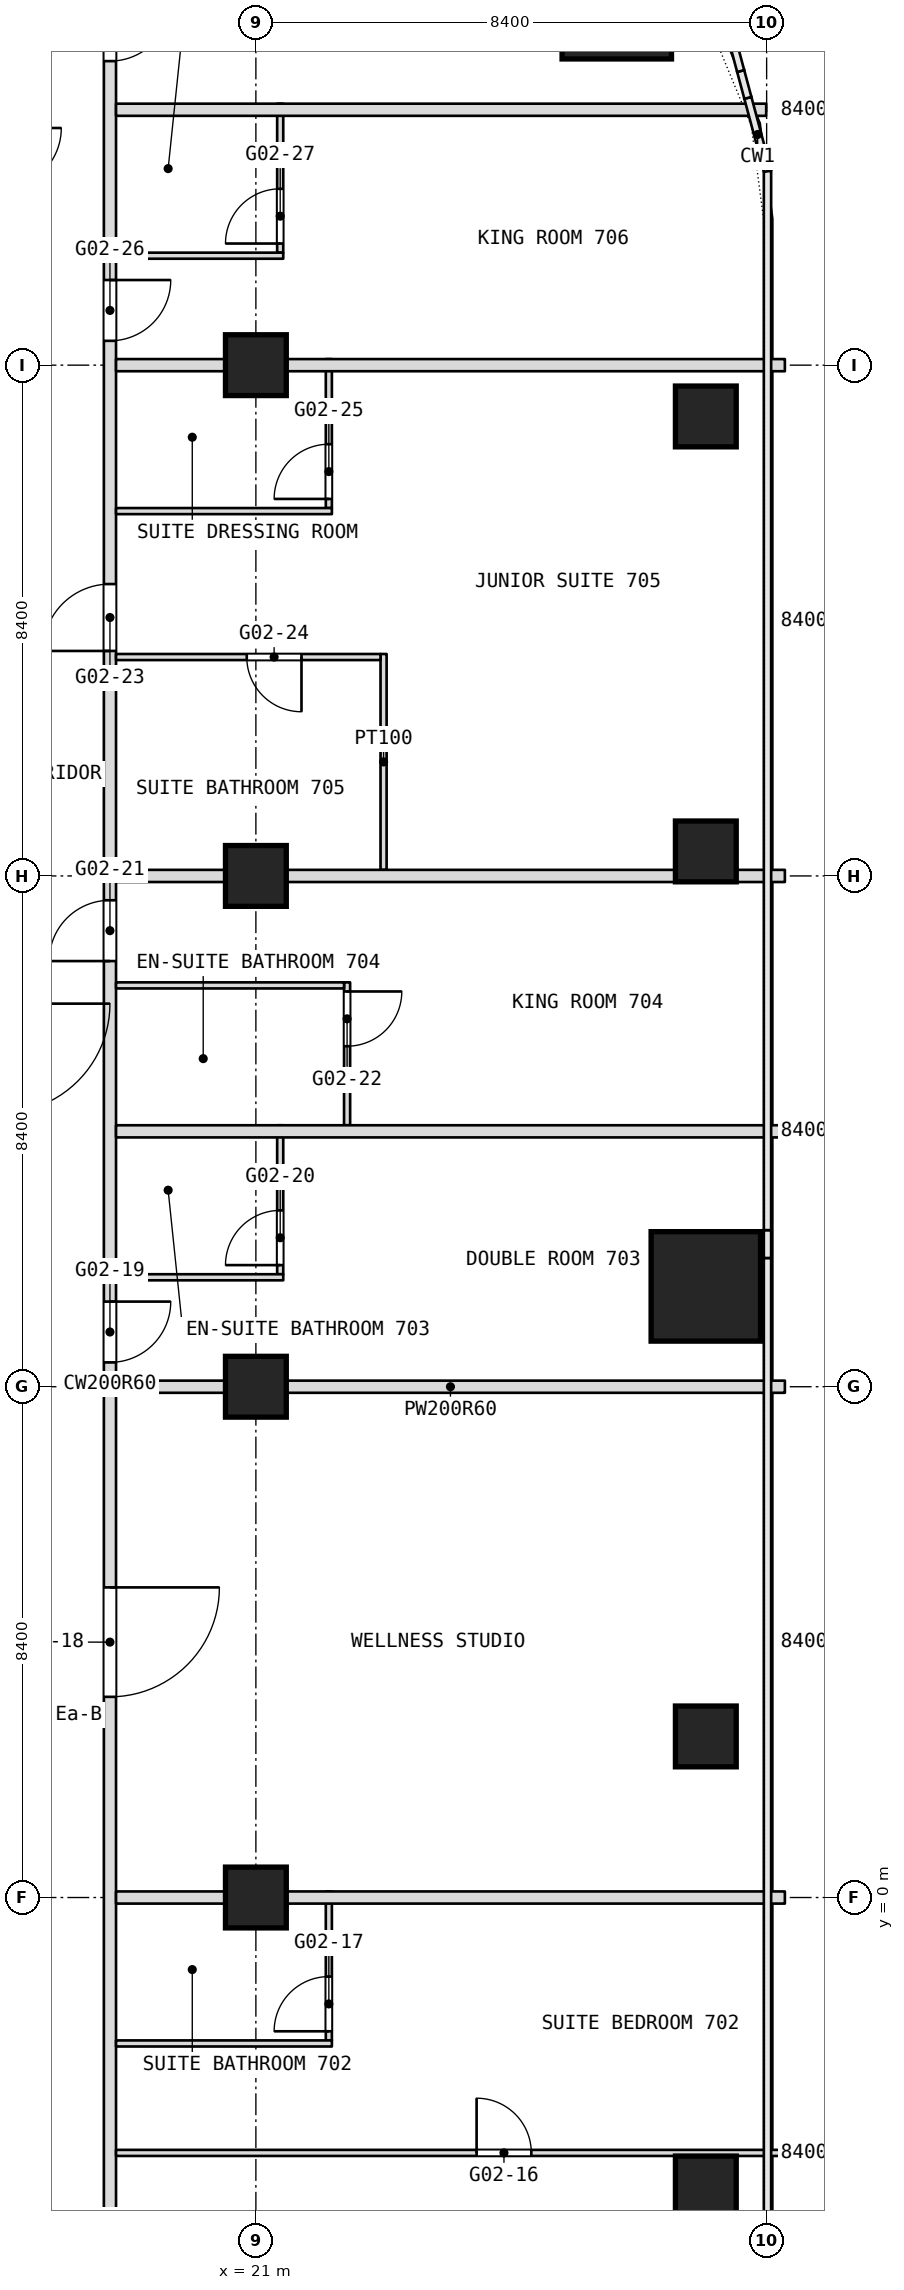
"""IFC4 building model, lengths in metres.
Left out: names, types, materials, properties, quantities, classifications, styles, units other than length and angle.
Written with IfcOpenShell. Run it as: python <this file> out.ifc"""

import sys

from ifc_helpers import new_model, si_unit, direction, frame, frame_2d, origin, origin_2d, place, context, subcontext, project, spatial, rectangle, extrude, element, fill, save


model = new_model("IFC4")
c1 = context("Model", 3, precision=1e-05, world=origin(), true_north=direction((0.0, 1.0)))
c2 = subcontext(c1, "Body", "Model", "MODEL_VIEW")
j1 = project(units=[si_unit("LENGTHUNIT", "METRE"), si_unit("PLANEANGLEUNIT", "RADIAN")], contexts=[c1])
p1 = place(None, origin())
s1 = spatial("IfcSite", under=j1, at=p1, CompositionType="ELEMENT")
p2 = place(p1, origin())
s2 = spatial("IfcBuilding", under=s1, at=p2, CompositionType="ELEMENT")
p3 = place(p2, frame((0.0, 0.0, 40.1)))
s3 = spatial("IfcBuildingStorey", under=s2, at=p3, CompositionType="ELEMENT", Elevation=40.1)
for number, where, z_axis, x_axis in (
    (1, (28.4, 10.05, 0.0), (0.0, 0.0, 1.0), (1.0, 0.0, 0.0)),
    (2, (26.936, 31.135, 0.0), (0.0, 0.0, 1.0), (1.0, 0.0, 0.0)),
):
    element("IfcColumn", number, at=place(p3, frame(where, z_axis=z_axis, x_axis=x_axis)), inside=s3, PredefinedType="COLUMN", context=c2, shape_type="SweptSolid", body=[
        extrude(rectangle(XDim=1.8, YDim=1.8, at=origin_2d()), origin(), (0.0, 0.0, 1.0), 3.6),
    ])
for number, where, z_axis, x_axis in (
    (3, (21.0, 0.0, 0.0), (0.0, 0.0, 1.0), (1.0, 0.0, 0.0)),
    (4, (21.0, 8.4, 0.0), (0.0, 0.0, 1.0), (1.0, 0.0, 0.0)),
    (5, (21.0, 16.8, 0.0), (0.0, 0.0, 1.0), (1.0, 0.0, 0.0)),
    (6, (21.0, 25.2, 0.0), (0.0, 0.0, 1.0), (1.0, 0.0, 0.0)),
    (7, (28.4, 24.356, 0.0), (0.0, 0.0, 1.0), (1.0, 0.0, 0.0)),
    (8, (28.4, 17.203, 0.0), (0.0, 0.0, 1.0), (1.0, 0.0, 0.0)),
    (9, (28.4, 2.649, 0.0), (0.0, 0.0, 1.0), (1.0, 0.0, 0.0)),
    (10, (28.4, -4.752, 0.0), (0.0, 0.0, 1.0), (1.0, 0.0, 0.0)),
):
    element("IfcColumn", number, at=place(p3, frame(where, z_axis=z_axis, x_axis=x_axis)), inside=s3, PredefinedType="COLUMN", context=c2, shape_type="SweptSolid", body=[
        extrude(rectangle(XDim=1.0, YDim=1.0, at=origin_2d()), origin(), (0.0, 0.0, 1.0), 3.6),
    ])
p4 = place(p3, frame((23.1, 16.9, 0.0), z_axis=(0.0, 0.0, 1.0), x_axis=(0.0, 1.0, 0.0)))
e11 = element("IfcWall", 11, at=p4, inside=s3, PredefinedType="PARTITIONING", context=c2, shape_type="SweptSolid", body=[
    extrude(rectangle(XDim=3.55, YDim=0.1, at=frame_2d((1.775, 0.0))), origin(), (0.0, 0.0, 1.0), 3.34),
])
p5 = place(p3, frame((22.5, 12.7, 0.0), z_axis=(0.0, 0.0, 1.0), x_axis=(0.0, 1.0, 0.0)))
e12 = element("IfcWall", 12, at=p5, inside=s3, PredefinedType="PARTITIONING", context=c2, shape_type="SweptSolid", body=[
    extrude(rectangle(XDim=2.35, YDim=0.1, at=frame_2d((1.175, 0.0))), origin(), (0.0, 0.0, 1.0), 3.34),
])
p6 = place(p5, frame((1.3, 0.0, 0.0)))
e13 = element("IfcOpeningElement", 13, at=p6, cuts=e12, PredefinedType="OPENING", context=c2, shape_type="SweptSolid", body=[
    extrude(rectangle(XDim=0.9, YDim=2.1, at=frame_2d((0.45, 1.05))), frame((0.0, 0.05, 0.0), z_axis=(0.0, -1.0, 0.0), x_axis=(1.0, 0.0, 0.0)), (0.0, 0.0, 1.0), 0.1),
])
p7 = place(p3, frame((22.2, -2.35, 0.0), z_axis=(0.0, 0.0, 1.0), x_axis=(0.0, 1.0, 0.0)))
e14 = element("IfcWall", 14, at=p7, inside=s3, PredefinedType="PARTITIONING", context=c2, shape_type="SweptSolid", body=[
    extrude(rectangle(XDim=2.45, YDim=0.1, at=frame_2d((1.225, 0.0))), origin(), (0.0, 0.0, 1.0), 3.34),
])
p8 = place(p7, frame((0.15, 0.0, 0.0)))
e15 = element("IfcOpeningElement", 15, at=p8, cuts=e14, PredefinedType="OPENING", context=c2, shape_type="SweptSolid", body=[
    extrude(rectangle(XDim=0.9, YDim=2.1, at=frame_2d((0.45, 1.05))), frame((0.0, 0.05, 0.0), z_axis=(0.0, -1.0, 0.0), x_axis=(1.0, 0.0, 0.0)), (0.0, 0.0, 1.0), 0.1),
])
p9 = place(p3, frame((22.2, 22.85, 0.0), z_axis=(0.0, 0.0, 1.0), x_axis=(0.0, 1.0, 0.0)))
e16 = element("IfcWall", 16, at=p9, inside=s3, PredefinedType="PARTITIONING", context=c2, shape_type="SweptSolid", body=[
    extrude(rectangle(XDim=2.45, YDim=0.1, at=frame_2d((1.225, 0.0))), origin(), (0.0, 0.0, 1.0), 3.34),
])
p10 = place(p9, frame((0.15, 0.0, 0.0)))
e17 = element("IfcOpeningElement", 17, at=p10, cuts=e16, PredefinedType="OPENING", context=c2, shape_type="SweptSolid", body=[
    extrude(rectangle(XDim=0.9, YDim=2.1, at=frame_2d((0.45, 1.05))), frame((0.0, 0.05, 0.0), z_axis=(0.0, -1.0, 0.0), x_axis=(1.0, 0.0, 0.0)), (0.0, 0.0, 1.0), 0.1),
])
p11 = place(p3, frame((21.4, 10.25, 0.0), z_axis=(0.0, 0.0, 1.0), x_axis=(0.0, 1.0, 0.0)))
e18 = element("IfcWall", 18, at=p11, inside=s3, PredefinedType="PARTITIONING", context=c2, shape_type="SweptSolid", body=[
    extrude(rectangle(XDim=2.45, YDim=0.1, at=frame_2d((1.225, 0.0))), origin(), (0.0, 0.0, 1.0), 3.34),
])
p12 = place(p11, frame((0.15, 0.0, 0.0)))
e19 = element("IfcOpeningElement", 19, at=p12, cuts=e18, PredefinedType="OPENING", context=c2, shape_type="SweptSolid", body=[
    extrude(rectangle(XDim=0.9, YDim=2.1, at=frame_2d((0.45, 1.05))), frame((0.0, 0.05, 0.0), z_axis=(0.0, -1.0, 0.0), x_axis=(1.0, 0.0, 0.0)), (0.0, 0.0, 1.0), 0.1),
])
p13 = place(p3, frame((21.4, 27.05, 0.0), z_axis=(0.0, 0.0, 1.0), x_axis=(0.0, 1.0, 0.0)))
e20 = element("IfcWall", 20, at=p13, inside=s3, PredefinedType="PARTITIONING", context=c2, shape_type="SweptSolid", body=[
    extrude(rectangle(XDim=2.45, YDim=0.1, at=frame_2d((1.225, 0.0))), origin(), (0.0, 0.0, 1.0), 3.34),
])
p14 = place(p13, frame((0.15, 0.0, 0.0)))
e21 = element("IfcOpeningElement", 21, at=p14, cuts=e20, PredefinedType="OPENING", context=c2, shape_type="SweptSolid", body=[
    extrude(rectangle(XDim=0.9, YDim=2.1, at=frame_2d((0.45, 1.05))), frame((0.0, 0.05, 0.0), z_axis=(0.0, -1.0, 0.0), x_axis=(1.0, 0.0, 0.0)), (0.0, 0.0, 1.0), 0.1),
])
p15 = place(p3, frame((18.6, -16.665, 0.0), z_axis=(0.0, 0.0, 1.0), x_axis=(0.0, 1.0, 0.0)))
e22 = element("IfcWall", 22, at=p15, inside=s3, PredefinedType="PARTITIONING", context=c2, shape_type="SweptSolid", body=[
    extrude(rectangle(XDim=50.205, YDim=0.2, at=frame_2d((25.103, 0.0))), origin(), (0.0, 0.0, 1.0), 3.34),
])
p16 = place(p15, frame((4.0, 0.0, 0.0)))
e23 = element("IfcOpeningElement", 23, at=p16, cuts=e22, PredefinedType="OPENING", context=c2, shape_type="SweptSolid", body=[
    extrude(rectangle(XDim=1.1, YDim=2.1, at=frame_2d((0.55, 1.05))), frame((0.0, 0.1, 0.0), z_axis=(0.0, -1.0, 0.0), x_axis=(1.0, 0.0, 0.0)), (0.0, 0.0, 1.0), 0.2),
])
p17 = place(p15, frame((9.815, 0.0, 0.0)))
e24 = element("IfcOpeningElement", 24, at=p17, cuts=e22, PredefinedType="OPENING", context=c2, shape_type="SweptSolid", body=[
    extrude(rectangle(XDim=1.1, YDim=2.1, at=frame_2d((0.55, 1.05))), frame((0.0, 0.1, 0.0), z_axis=(0.0, -1.0, 0.0), x_axis=(1.0, 0.0, 0.0)), (0.0, 0.0, 1.0), 0.2),
])
p18 = place(p15, frame((19.965, 0.0, 0.0)))
e25 = element("IfcOpeningElement", 25, at=p18, cuts=e22, PredefinedType="OPENING", context=c2, shape_type="SweptSolid", body=[
    extrude(rectangle(XDim=1.8, YDim=2.1, at=frame_2d((0.9, 1.05))), frame((0.0, 0.1, 0.0), z_axis=(0.0, -1.0, 0.0), x_axis=(1.0, 0.0, 0.0)), (0.0, 0.0, 1.0), 0.2),
])
p19 = place(p15, frame((25.465, 0.0, 0.0)))
e26 = element("IfcOpeningElement", 26, at=p19, cuts=e22, PredefinedType="OPENING", context=c2, shape_type="SweptSolid", body=[
    extrude(rectangle(XDim=1.0, YDim=2.1, at=frame_2d((0.5, 1.05))), frame((0.0, 0.1, 0.0), z_axis=(0.0, -1.0, 0.0), x_axis=(1.0, 0.0, 0.0)), (0.0, 0.0, 1.0), 0.2),
])
p20 = place(p15, frame((32.065, 0.0, 0.0)))
e27 = element("IfcOpeningElement", 27, at=p20, cuts=e22, PredefinedType="OPENING", context=c2, shape_type="SweptSolid", body=[
    extrude(rectangle(XDim=1.0, YDim=2.1, at=frame_2d((0.5, 1.05))), frame((0.0, 0.1, 0.0), z_axis=(0.0, -1.0, 0.0), x_axis=(1.0, 0.0, 0.0)), (0.0, 0.0, 1.0), 0.2),
])
p21 = place(p15, frame((37.165, 0.0, 0.0)))
e28 = element("IfcOpeningElement", 28, at=p21, cuts=e22, PredefinedType="OPENING", context=c2, shape_type="SweptSolid", body=[
    extrude(rectangle(XDim=1.1, YDim=2.1, at=frame_2d((0.55, 1.05))), frame((0.0, 0.1, 0.0), z_axis=(0.0, -1.0, 0.0), x_axis=(1.0, 0.0, 0.0)), (0.0, 0.0, 1.0), 0.2),
])
p22 = place(p15, frame((42.265, 0.0, 0.0)))
e29 = element("IfcOpeningElement", 29, at=p22, cuts=e22, PredefinedType="OPENING", context=c2, shape_type="SweptSolid", body=[
    extrude(rectangle(XDim=1.0, YDim=2.1, at=frame_2d((0.5, 1.05))), frame((0.0, 0.1, 0.0), z_axis=(0.0, -1.0, 0.0), x_axis=(1.0, 0.0, 0.0)), (0.0, 0.0, 1.0), 0.2),
])
p23 = place(p15, frame((46.865, 0.0, 0.0)))
e30 = element("IfcOpeningElement", 30, at=p23, cuts=e22, PredefinedType="OPENING", context=c2, shape_type="SweptSolid", body=[
    extrude(rectangle(XDim=1.0, YDim=2.1, at=frame_2d((0.5, 1.05))), frame((0.0, 0.1, 0.0), z_axis=(0.0, -1.0, 0.0), x_axis=(1.0, 0.0, 0.0)), (0.0, 0.0, 1.0), 0.2),
])
p24 = place(p3, frame((18.7, -4.2, 0.0), z_axis=(0.0, 0.0, 1.0), x_axis=(1.0, 0.0, 0.0)))
e31 = element("IfcWall", 31, at=p24, inside=s3, PredefinedType="PARTITIONING", context=c2, shape_type="SweptSolid", body=[
    extrude(rectangle(XDim=11.0, YDim=0.1, at=frame_2d((5.5, 0.0))), origin(), (0.0, 0.0, 1.0), 3.34),
])
p25 = place(p24, frame((5.93, 0.0, 0.0)))
e32 = element("IfcOpeningElement", 32, at=p25, cuts=e31, PredefinedType="OPENING", context=c2, shape_type="SweptSolid", body=[
    extrude(rectangle(XDim=0.9, YDim=2.1, at=frame_2d((0.45, 1.05))), frame((0.0, 0.05, 0.0), z_axis=(0.0, -1.0, 0.0), x_axis=(1.0, 0.0, 0.0)), (0.0, 0.0, 1.0), 0.1),
])
p26 = place(p3, frame((18.7, -2.4, 0.0), z_axis=(0.0, 0.0, 1.0), x_axis=(1.0, 0.0, 0.0)))
e33 = element("IfcWall", 33, at=p26, inside=s3, PredefinedType="PARTITIONING", context=c2, shape_type="SweptSolid", body=[
    extrude(rectangle(XDim=3.55, YDim=0.1, at=frame_2d((1.775, 0.0))), origin(), (0.0, 0.0, 1.0), 3.34),
])
for number, where, z_axis, x_axis in (
    (34, (18.7, 0.0, 0.0), (0.0, 0.0, 1.0), (1.0, 0.0, 0.0)),
    (35, (18.7, 8.4, 0.0), (0.0, 0.0, 1.0), (1.0, 0.0, 0.0)),
):
    element("IfcWall", number, at=place(p3, frame(where, z_axis=z_axis, x_axis=x_axis)), inside=s3, PredefinedType="PARTITIONING", context=c2, shape_type="SweptSolid", body=[
        extrude(rectangle(XDim=11.0, YDim=0.2, at=frame_2d((5.5, 0.0))), origin(), (0.0, 0.0, 1.0), 2.84),
    ])
p27 = place(p3, frame((18.7, 10.2, 0.0), z_axis=(0.0, 0.0, 1.0), x_axis=(1.0, 0.0, 0.0)))
e36 = element("IfcWall", 36, at=p27, inside=s3, PredefinedType="PARTITIONING", context=c2, shape_type="SweptSolid", body=[
    extrude(rectangle(XDim=2.75, YDim=0.1, at=frame_2d((1.375, 0.0))), origin(), (0.0, 0.0, 1.0), 3.34),
])
p28 = place(p3, frame((18.7, 12.6, 0.0), z_axis=(0.0, 0.0, 1.0), x_axis=(1.0, 0.0, 0.0)))
e37 = element("IfcWall", 37, at=p28, inside=s3, PredefinedType="PARTITIONING", context=c2, shape_type="SweptSolid", body=[
    extrude(rectangle(XDim=11.0, YDim=0.2, at=frame_2d((5.5, 0.0))), origin(), (0.0, 0.0, 1.0), 3.34),
])
p29 = place(p3, frame((18.7, 15.0, 0.0), z_axis=(0.0, 0.0, 1.0), x_axis=(1.0, 0.0, 0.0)))
e38 = element("IfcWall", 38, at=p29, inside=s3, PredefinedType="PARTITIONING", context=c2, shape_type="SweptSolid", body=[
    extrude(rectangle(XDim=3.75, YDim=0.1, at=frame_2d((1.875, 0.0))), origin(), (0.0, 0.0, 1.0), 3.34),
])
p30 = place(p3, frame((18.7, 16.8, 0.0), z_axis=(0.0, 0.0, 1.0), x_axis=(1.0, 0.0, 0.0)))
e39 = element("IfcWall", 39, at=p30, inside=s3, PredefinedType="PARTITIONING", context=c2, shape_type="SweptSolid", body=[
    extrude(rectangle(XDim=11.0, YDim=0.2, at=frame_2d((5.5, 0.0))), origin(), (0.0, 0.0, 1.0), 2.84),
])
p31 = place(p3, frame((18.7, 20.4, 0.0), z_axis=(0.0, 0.0, 1.0), x_axis=(1.0, 0.0, 0.0)))
e40 = element("IfcWall", 40, at=p31, inside=s3, PredefinedType="PARTITIONING", context=c2, shape_type="SweptSolid", body=[
    extrude(rectangle(XDim=4.35, YDim=0.1, at=frame_2d((2.175, 0.0))), origin(), (0.0, 0.0, 1.0), 3.34),
])
p32 = place(p31, frame((2.15, 0.0, 0.0)))
e41 = element("IfcOpeningElement", 41, at=p32, cuts=e40, PredefinedType="OPENING", context=c2, shape_type="SweptSolid", body=[
    extrude(rectangle(XDim=0.9, YDim=2.1, at=frame_2d((0.45, 1.05))), frame((0.0, 0.05, 0.0), z_axis=(0.0, -1.0, 0.0), x_axis=(1.0, 0.0, 0.0)), (0.0, 0.0, 1.0), 0.1),
])
p33 = place(p3, frame((18.7, 22.8, 0.0), z_axis=(0.0, 0.0, 1.0), x_axis=(1.0, 0.0, 0.0)))
e42 = element("IfcWall", 42, at=p33, inside=s3, PredefinedType="PARTITIONING", context=c2, shape_type="SweptSolid", body=[
    extrude(rectangle(XDim=3.55, YDim=0.1, at=frame_2d((1.775, 0.0))), origin(), (0.0, 0.0, 1.0), 3.34),
])
p34 = place(p3, frame((18.7, 25.2, 0.0), z_axis=(0.0, 0.0, 1.0), x_axis=(1.0, 0.0, 0.0)))
e43 = element("IfcWall", 43, at=p34, inside=s3, PredefinedType="PARTITIONING", context=c2, shape_type="SweptSolid", body=[
    extrude(rectangle(XDim=11.0, YDim=0.2, at=frame_2d((5.5, 0.0))), origin(), (0.0, 0.0, 1.0), 2.84),
])
p35 = place(p3, frame((18.7, 27.0, 0.0), z_axis=(0.0, 0.0, 1.0), x_axis=(1.0, 0.0, 0.0)))
e44 = element("IfcWall", 44, at=p35, inside=s3, PredefinedType="PARTITIONING", context=c2, shape_type="SweptSolid", body=[
    extrude(rectangle(XDim=2.75, YDim=0.1, at=frame_2d((1.375, 0.0))), origin(), (0.0, 0.0, 1.0), 3.34),
])
p36 = place(p3, frame((18.7, 29.4, 0.0), z_axis=(0.0, 0.0, 1.0), x_axis=(1.0, 0.0, 0.0)))
e45 = element("IfcWall", 45, at=p36, inside=s3, PredefinedType="PARTITIONING", context=c2, shape_type="SweptSolid", body=[
    extrude(rectangle(XDim=10.693, YDim=0.2, at=frame_2d((5.347, 0.0))), origin(), (0.0, 0.0, 1.0), 3.34),
])
p37 = place(p6, origin())
e46 = element("IfcDoor", 46, at=p37, inside=s3, OperationType="SINGLE_SWING_RIGHT", PredefinedType="DOOR", context=c2, shape_type="SweptSolid", body=[
    extrude(rectangle(XDim=0.9, YDim=2.1, at=frame_2d((0.45, 1.05))), frame((0.0, 0.025, 0.0), z_axis=(0.0, -1.0, 0.0), x_axis=(1.0, 0.0, 0.0)), (0.0, 0.0, 1.0), 0.05),
])
fill(e13, e46)
p38 = place(p8, origin())
e47 = element("IfcDoor", 47, at=p38, inside=s3, OperationType="SINGLE_SWING_LEFT", PredefinedType="DOOR", context=c2, shape_type="SweptSolid", body=[
    extrude(rectangle(XDim=0.9, YDim=2.1, at=frame_2d((0.45, 1.05))), frame((0.0, 0.025, 0.0), z_axis=(0.0, -1.0, 0.0), x_axis=(1.0, 0.0, 0.0)), (0.0, 0.0, 1.0), 0.05),
])
fill(e15, e47)
p39 = place(p10, origin())
e48 = element("IfcDoor", 48, at=p39, inside=s3, OperationType="SINGLE_SWING_LEFT", PredefinedType="DOOR", context=c2, shape_type="SweptSolid", body=[
    extrude(rectangle(XDim=0.9, YDim=2.1, at=frame_2d((0.45, 1.05))), frame((0.0, 0.025, 0.0), z_axis=(0.0, -1.0, 0.0), x_axis=(1.0, 0.0, 0.0)), (0.0, 0.0, 1.0), 0.05),
])
fill(e17, e48)
p40 = place(p12, origin())
e49 = element("IfcDoor", 49, at=p40, inside=s3, OperationType="SINGLE_SWING_LEFT", PredefinedType="DOOR", context=c2, shape_type="SweptSolid", body=[
    extrude(rectangle(XDim=0.9, YDim=2.1, at=frame_2d((0.45, 1.05))), frame((0.0, 0.025, 0.0), z_axis=(0.0, -1.0, 0.0), x_axis=(1.0, 0.0, 0.0)), (0.0, 0.0, 1.0), 0.05),
])
fill(e19, e49)
p41 = place(p14, origin())
e50 = element("IfcDoor", 50, at=p41, inside=s3, OperationType="SINGLE_SWING_LEFT", PredefinedType="DOOR", context=c2, shape_type="SweptSolid", body=[
    extrude(rectangle(XDim=0.9, YDim=2.1, at=frame_2d((0.45, 1.05))), frame((0.0, 0.025, 0.0), z_axis=(0.0, -1.0, 0.0), x_axis=(1.0, 0.0, 0.0)), (0.0, 0.0, 1.0), 0.05),
])
fill(e21, e50)
p42 = place(p18, origin())
e51 = element("IfcDoor", 51, at=p42, inside=s3, OperationType="DOUBLE_DOOR_SINGLE_SWING", PredefinedType="DOOR", context=c2, shape_type="SweptSolid", body=[
    extrude(rectangle(XDim=1.8, YDim=2.1, at=frame_2d((0.9, 1.05))), frame((0.0, 0.025, 0.0), z_axis=(0.0, -1.0, 0.0), x_axis=(1.0, 0.0, 0.0)), (0.0, 0.0, 1.0), 0.05),
])
fill(e25, e51)
p43 = place(p19, origin())
e52 = element("IfcDoor", 52, at=p43, inside=s3, OperationType="SINGLE_SWING_LEFT", PredefinedType="DOOR", context=c2, shape_type="SweptSolid", body=[
    extrude(rectangle(XDim=1.0, YDim=2.1, at=frame_2d((0.5, 1.05))), frame((0.0, 0.025, 0.0), z_axis=(0.0, -1.0, 0.0), x_axis=(1.0, 0.0, 0.0)), (0.0, 0.0, 1.0), 0.05),
])
fill(e26, e52)
p44 = place(p20, origin())
e53 = element("IfcDoor", 53, at=p44, inside=s3, OperationType="SINGLE_SWING_LEFT", PredefinedType="DOOR", context=c2, shape_type="SweptSolid", body=[
    extrude(rectangle(XDim=1.0, YDim=2.1, at=frame_2d((0.5, 1.05))), frame((0.0, 0.025, 0.0), z_axis=(0.0, -1.0, 0.0), x_axis=(1.0, 0.0, 0.0)), (0.0, 0.0, 1.0), 0.05),
])
fill(e27, e53)
p45 = place(p21, origin())
e54 = element("IfcDoor", 54, at=p45, inside=s3, OperationType="SINGLE_SWING_RIGHT", PredefinedType="DOOR", context=c2, shape_type="SweptSolid", body=[
    extrude(rectangle(XDim=1.1, YDim=2.1, at=frame_2d((0.55, 1.05))), frame((0.0, 0.025, 0.0), z_axis=(0.0, -1.0, 0.0), x_axis=(1.0, 0.0, 0.0)), (0.0, 0.0, 1.0), 0.05),
])
fill(e28, e54)
p46 = place(p22, origin())
e55 = element("IfcDoor", 55, at=p46, inside=s3, OperationType="SINGLE_SWING_RIGHT", PredefinedType="DOOR", context=c2, shape_type="SweptSolid", body=[
    extrude(rectangle(XDim=1.0, YDim=2.1, at=frame_2d((0.5, 1.05))), frame((0.0, 0.025, 0.0), z_axis=(0.0, -1.0, 0.0), x_axis=(1.0, 0.0, 0.0)), (0.0, 0.0, 1.0), 0.05),
])
fill(e29, e55)
p47 = place(p23, origin())
e56 = element("IfcDoor", 56, at=p47, inside=s3, OperationType="SINGLE_SWING_LEFT", PredefinedType="DOOR", context=c2, shape_type="SweptSolid", body=[
    extrude(rectangle(XDim=1.0, YDim=2.1, at=frame_2d((0.5, 1.05))), frame((0.0, 0.025, 0.0), z_axis=(0.0, -1.0, 0.0), x_axis=(1.0, 0.0, 0.0)), (0.0, 0.0, 1.0), 0.05),
])
fill(e30, e56)
p48 = place(p25, origin())
e57 = element("IfcDoor", 57, at=p48, inside=s3, OperationType="SINGLE_SWING_RIGHT", PredefinedType="DOOR", context=c2, shape_type="SweptSolid", body=[
    extrude(rectangle(XDim=0.9, YDim=2.1, at=frame_2d((0.45, 1.05))), frame((0.0, 0.025, 0.0), z_axis=(0.0, -1.0, 0.0), x_axis=(1.0, 0.0, 0.0)), (0.0, 0.0, 1.0), 0.05),
])
fill(e32, e57)
p49 = place(p32, origin())
e58 = element("IfcDoor", 58, at=p49, inside=s3, OperationType="SINGLE_SWING_LEFT", PredefinedType="DOOR", context=c2, shape_type="SweptSolid", body=[
    extrude(rectangle(XDim=0.9, YDim=2.1, at=frame_2d((0.45, 1.05))), frame((0.0, 0.025, 0.0), z_axis=(0.0, -1.0, 0.0), x_axis=(1.0, 0.0, 0.0)), (0.0, 0.0, 1.0), 0.05),
])
fill(e41, e58)
save(model, sys.argv[1])
